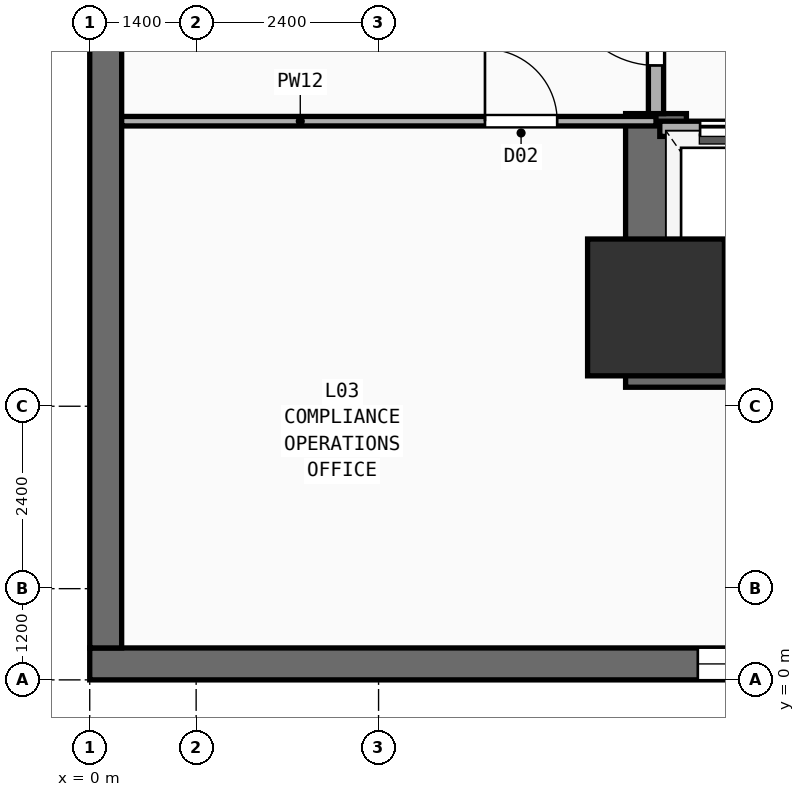
"""IFC4 building model, lengths in metres.
Left out: names, types, materials, properties, quantities, classifications, styles, units other than length and angle.
Written with IfcOpenShell. Run it as: python <this file> out.ifc"""

import sys

from ifc_helpers import new_model, si_unit, direction, frame, frame_2d, origin, origin_2d, place, context, subcontext, project, spatial, rectangle, extrude, element, fill, save


model = new_model("IFC4")
c1 = context("Model", 3, precision=1e-05, world=origin(), true_north=direction((0.0, 1.0)))
c2 = subcontext(c1, "Body", "Model", "MODEL_VIEW")
j1 = project(units=[si_unit("LENGTHUNIT", "METRE"), si_unit("PLANEANGLEUNIT", "RADIAN")], contexts=[c1])
p1 = place(None, origin())
s1 = spatial("IfcSite", under=j1, at=p1, CompositionType="ELEMENT")
p2 = place(p1, origin())
s2 = spatial("IfcBuilding", under=s1, at=p2, CompositionType="ELEMENT")
p3 = place(p2, frame((0.0, 0.0, 10.4)))
s3 = spatial("IfcBuildingStorey", under=s2, at=p3, CompositionType="ELEMENT", Elevation=10.4)
p4 = place(p3, frame((7.05, 4.25, 0.0), z_axis=(0.0, 0.0, 1.0), x_axis=(1.0, 0.0, 0.0)))
e1 = element("IfcWall", 1, at=p4, inside=s3, PredefinedType="SHEAR", context=c2, shape_type="SweptSolid", body=[
    extrude(rectangle(XDim=14.15, YDim=0.8, at=frame_2d((7.075, 0.0))), origin(), (0.0, 0.0, 1.0), 4.46),
])
p5 = place(p3, frame((7.45, 4.65, 0.0), z_axis=(0.0, 0.0, 1.0), x_axis=(0.0, 1.0, 0.0)))
e2 = element("IfcWall", 2, at=p5, inside=s3, PredefinedType="SHEAR", context=c2, shape_type="SweptSolid", body=[
    extrude(rectangle(XDim=2.8, YDim=0.8, at=frame_2d((1.4, 0.0))), origin(), (0.0, 0.0, 1.0), 4.46),
])
p6 = place(p3, frame((7.45, 4.9, 0.0), z_axis=(0.0, 0.0, 1.0), x_axis=(1.0, 0.0, 0.0)))
e3 = element("IfcColumn", 3, at=p6, inside=s3, PredefinedType="COLUMN", context=c2, shape_type="SweptSolid", body=[
    extrude(rectangle(XDim=1.8, YDim=1.8, at=origin_2d()), origin(), (0.0, 0.0, 1.0), 4.46),
])
p7 = place(p3, frame((0.0, 0.21, 0.0), z_axis=(0.0, 0.0, 1.0), x_axis=(1.0, 0.0, 0.0)))
e4 = element("IfcWall", 4, at=p7, inside=s3, PredefinedType="SOLIDWALL", context=c2, shape_type="SweptSolid", body=[
    extrude(rectangle(XDim=64.8, YDim=0.42, at=frame_2d((32.4, 0.0))), origin(), (0.0, 0.0, 1.0), 4.46),
])
p8 = place(p7, frame((8.0, 0.0, 0.95)))
e5 = element("IfcOpeningElement", 5, at=p8, cuts=e4, PredefinedType="OPENING", context=c2, shape_type="SweptSolid", body=[
    extrude(rectangle(XDim=1.8, YDim=2.1, at=frame_2d((0.9, 1.05))), frame((0.0, 0.22, 0.0), z_axis=(0.0, -1.0, 0.0), x_axis=(1.0, 0.0, 0.0)), (0.0, 0.0, 1.0), 0.44),
])
p9 = place(p7, frame((16.0, 0.0, 0.95)))
e6 = element("IfcOpeningElement", 6, at=p9, cuts=e4, PredefinedType="OPENING", context=c2, shape_type="SweptSolid", body=[
    extrude(rectangle(XDim=1.8, YDim=2.1, at=frame_2d((0.9, 1.05))), frame((0.0, 0.22, 0.0), z_axis=(0.0, -1.0, 0.0), x_axis=(1.0, 0.0, 0.0)), (0.0, 0.0, 1.0), 0.44),
])
p10 = place(p7, frame((24.0, 0.0, 0.95)))
e7 = element("IfcOpeningElement", 7, at=p10, cuts=e4, PredefinedType="OPENING", context=c2, shape_type="SweptSolid", body=[
    extrude(rectangle(XDim=1.8, YDim=2.1, at=frame_2d((0.9, 1.05))), frame((0.0, 0.22, 0.0), z_axis=(0.0, -1.0, 0.0), x_axis=(1.0, 0.0, 0.0)), (0.0, 0.0, 1.0), 0.44),
])
p11 = place(p7, frame((34.0, 0.0, 0.95)))
e8 = element("IfcOpeningElement", 8, at=p11, cuts=e4, PredefinedType="OPENING", context=c2, shape_type="SweptSolid", body=[
    extrude(rectangle(XDim=1.8, YDim=2.1, at=frame_2d((0.9, 1.05))), frame((0.0, 0.22, 0.0), z_axis=(0.0, -1.0, 0.0), x_axis=(1.0, 0.0, 0.0)), (0.0, 0.0, 1.0), 0.44),
])
p12 = place(p7, frame((44.5, 0.0, 0.95)))
e9 = element("IfcOpeningElement", 9, at=p12, cuts=e4, PredefinedType="OPENING", context=c2, shape_type="SweptSolid", body=[
    extrude(rectangle(XDim=1.8, YDim=2.1, at=frame_2d((0.9, 1.05))), frame((0.0, 0.22, 0.0), z_axis=(0.0, -1.0, 0.0), x_axis=(1.0, 0.0, 0.0)), (0.0, 0.0, 1.0), 0.44),
])
p13 = place(p7, frame((58.0, 0.0, 0.95)))
e10 = element("IfcOpeningElement", 10, at=p13, cuts=e4, PredefinedType="OPENING", context=c2, shape_type="SweptSolid", body=[
    extrude(rectangle(XDim=1.8, YDim=2.1, at=frame_2d((0.9, 1.05))), frame((0.0, 0.22, 0.0), z_axis=(0.0, -1.0, 0.0), x_axis=(1.0, 0.0, 0.0)), (0.0, 0.0, 1.0), 0.44),
])
p14 = place(p3, frame((0.21, 0.42, 0.0), z_axis=(0.0, 0.0, 1.0), x_axis=(0.0, 1.0, 0.0)))
e11 = element("IfcWall", 11, at=p14, inside=s3, PredefinedType="SOLIDWALL", context=c2, shape_type="SweptSolid", body=[
    extrude(rectangle(XDim=50.78, YDim=0.42, at=frame_2d((25.39, 0.0))), origin(), (0.0, 0.0, 1.0), 4.46),
])
p15 = place(p14, frame((8.0, 0.0, 0.95)))
e12 = element("IfcOpeningElement", 12, at=p15, cuts=e11, PredefinedType="OPENING", context=c2, shape_type="SweptSolid", body=[
    extrude(rectangle(XDim=1.8, YDim=2.1, at=frame_2d((0.9, 1.05))), frame((0.0, 0.22, 0.0), z_axis=(0.0, -1.0, 0.0), x_axis=(1.0, 0.0, 0.0)), (0.0, 0.0, 1.0), 0.44),
])
p16 = place(p14, frame((18.0, 0.0, 0.95)))
e13 = element("IfcOpeningElement", 13, at=p16, cuts=e11, PredefinedType="OPENING", context=c2, shape_type="SweptSolid", body=[
    extrude(rectangle(XDim=1.8, YDim=2.1, at=frame_2d((0.9, 1.05))), frame((0.0, 0.22, 0.0), z_axis=(0.0, -1.0, 0.0), x_axis=(1.0, 0.0, 0.0)), (0.0, 0.0, 1.0), 0.44),
])
p17 = place(p14, frame((27.5, 0.0, 0.95)))
e14 = element("IfcOpeningElement", 14, at=p17, cuts=e11, PredefinedType="OPENING", context=c2, shape_type="SweptSolid", body=[
    extrude(rectangle(XDim=1.8, YDim=2.1, at=frame_2d((0.9, 1.05))), frame((0.0, 0.22, 0.0), z_axis=(0.0, -1.0, 0.0), x_axis=(1.0, 0.0, 0.0)), (0.0, 0.0, 1.0), 0.44),
])
p18 = place(p14, frame((45.0, 0.0, 0.95)))
e15 = element("IfcOpeningElement", 15, at=p18, cuts=e11, PredefinedType="OPENING", context=c2, shape_type="SweptSolid", body=[
    extrude(rectangle(XDim=1.8, YDim=2.1, at=frame_2d((0.9, 1.05))), frame((0.0, 0.22, 0.0), z_axis=(0.0, -1.0, 0.0), x_axis=(1.0, 0.0, 0.0)), (0.0, 0.0, 1.0), 0.44),
])
p19 = place(p3, frame((7.5, 7.25, 0.0), z_axis=(0.0, 0.0, 1.0), x_axis=(1.0, 0.0, 0.0)))
e16 = element("IfcWall", 16, at=p19, inside=s3, PredefinedType="PARTITIONING", context=c2, shape_type="SweptSolid", body=[
    extrude(rectangle(XDim=8.35, YDim=0.2, at=frame_2d((4.175, 0.0))), origin(), (0.0, 0.0, 1.0), 4.46),
])
p20 = place(p19, frame((0.53, 0.0, 0.0)))
e17 = element("IfcOpeningElement", 17, at=p20, cuts=e16, PredefinedType="OPENING", context=c2, shape_type="SweptSolid", body=[
    extrude(rectangle(XDim=1.1, YDim=2.2, at=frame_2d((0.55, 1.1))), frame((0.0, 0.11, 0.0), z_axis=(0.0, -1.0, 0.0), x_axis=(1.0, 0.0, 0.0)), (0.0, 0.0, 1.0), 0.22),
])
p21 = place(p19, frame((2.37, 0.0, 0.0)))
e18 = element("IfcOpeningElement", 18, at=p21, cuts=e16, PredefinedType="OPENING", context=c2, shape_type="SweptSolid", body=[
    extrude(rectangle(XDim=1.1, YDim=2.2, at=frame_2d((0.55, 1.1))), frame((0.0, 0.11, 0.0), z_axis=(0.0, -1.0, 0.0), x_axis=(1.0, 0.0, 0.0)), (0.0, 0.0, 1.0), 0.22),
])
p22 = place(p19, frame((4.33, 0.0, 0.0)))
e19 = element("IfcOpeningElement", 19, at=p22, cuts=e16, PredefinedType="OPENING", context=c2, shape_type="SweptSolid", body=[
    extrude(rectangle(XDim=1.1, YDim=2.2, at=frame_2d((0.55, 1.1))), frame((0.0, 0.11, 0.0), z_axis=(0.0, -1.0, 0.0), x_axis=(1.0, 0.0, 0.0)), (0.0, 0.0, 1.0), 0.22),
])
p23 = place(p19, frame((6.5, 0.0, 0.0)))
e20 = element("IfcOpeningElement", 20, at=p23, cuts=e16, PredefinedType="OPENING", context=c2, shape_type="SweptSolid", body=[
    extrude(rectangle(XDim=1.1, YDim=2.2, at=frame_2d((0.55, 1.1))), frame((0.0, 0.11, 0.0), z_axis=(0.0, -1.0, 0.0), x_axis=(1.0, 0.0, 0.0)), (0.0, 0.0, 1.0), 0.22),
])
p24 = place(p3, frame((7.45, 7.45, 0.0), z_axis=(0.0, 0.0, 1.0), x_axis=(0.0, 1.0, 0.0)))
e21 = element("IfcWall", 21, at=p24, inside=s3, PredefinedType="PARTITIONING", context=c2, shape_type="SweptSolid", body=[
    extrude(rectangle(XDim=2.3, YDim=0.2, at=frame_2d((1.15, 0.0))), origin(), (0.0, 0.0, 1.0), 3.24),
])
p25 = place(p24, frame((0.633, 0.0, 0.0)))
e22 = element("IfcOpeningElement", 22, at=p25, cuts=e21, PredefinedType="OPENING", context=c2, shape_type="SweptSolid", body=[
    extrude(rectangle(XDim=1.2, YDim=2.25, at=frame_2d((0.6, 1.125))), frame((0.0, 0.11, 0.0), z_axis=(0.0, -1.0, 0.0), x_axis=(1.0, 0.0, 0.0)), (0.0, 0.0, 1.0), 0.22),
])
p26 = place(p3, frame((0.42, 7.35, 0.0), z_axis=(0.0, 0.0, 1.0), x_axis=(1.0, 0.0, 0.0)))
e23 = element("IfcWall", 23, at=p26, inside=s3, PredefinedType="PARTITIONING", context=c2, shape_type="SweptSolid", body=[
    extrude(rectangle(XDim=7.03, YDim=0.125, at=frame_2d((3.515, 0.0))), origin(), (0.0, 0.0, 1.0), 4.46),
])
p27 = place(p26, frame((4.78, 0.0, 0.0)))
e24 = element("IfcOpeningElement", 24, at=p27, cuts=e23, PredefinedType="OPENING", context=c2, shape_type="SweptSolid", body=[
    extrude(rectangle(XDim=0.95, YDim=2.15, at=frame_2d((0.475, 1.075))), frame((0.0, 0.073, 0.0), z_axis=(0.0, -1.0, 0.0), x_axis=(1.0, 0.0, 0.0)), (0.0, 0.0, 1.0), 0.145),
])
p28 = place(p8, origin())
e25 = element("IfcWindow", 25, at=p28, inside=s3, PartitioningType="SINGLE_PANEL", PredefinedType="WINDOW", context=c2, shape_type="SweptSolid", body=[
    extrude(rectangle(XDim=1.8, YDim=2.1, at=frame_2d((0.9, 1.05))), frame((0.0, 0.03, 0.0), z_axis=(0.0, -1.0, 0.0), x_axis=(1.0, 0.0, 0.0)), (0.0, 0.0, 1.0), 0.06),
])
fill(e5, e25)
p29 = place(p20, origin())
e26 = element("IfcDoor", 26, at=p29, inside=s3, OperationType="SLIDING_TO_LEFT", PredefinedType="DOOR", context=c2, shape_type="SweptSolid", body=[
    extrude(rectangle(XDim=1.1, YDim=2.2, at=frame_2d((0.55, 1.1))), frame((0.0, 0.025, 0.0), z_axis=(0.0, -1.0, 0.0), x_axis=(1.0, 0.0, 0.0)), (0.0, 0.0, 1.0), 0.05),
])
fill(e17, e26)
p30 = place(p25, frame((1.2, 0.0, 0.0), z_axis=(0.0, 0.0, 1.0), x_axis=(-1.0, 0.0, 0.0)))
e27 = element("IfcDoor", 27, at=p30, inside=s3, OperationType="SINGLE_SWING_LEFT", PredefinedType="DOOR", context=c2, shape_type="SweptSolid", body=[
    extrude(rectangle(XDim=1.2, YDim=2.25, at=frame_2d((0.6, 1.125))), frame((0.0, 0.025, 0.0), z_axis=(0.0, -1.0, 0.0), x_axis=(1.0, 0.0, 0.0)), (0.0, 0.0, 1.0), 0.05),
])
fill(e22, e27)
p31 = place(p27, origin())
e28 = element("IfcDoor", 28, at=p31, inside=s3, OperationType="SINGLE_SWING_LEFT", PredefinedType="DOOR", context=c2, shape_type="SweptSolid", body=[
    extrude(rectangle(XDim=0.95, YDim=2.15, at=frame_2d((0.475, 1.075))), frame((0.0, 0.025, 0.0), z_axis=(0.0, -1.0, 0.0), x_axis=(1.0, 0.0, 0.0)), (0.0, 0.0, 1.0), 0.05),
])
fill(e24, e28)
save(model, sys.argv[1])
